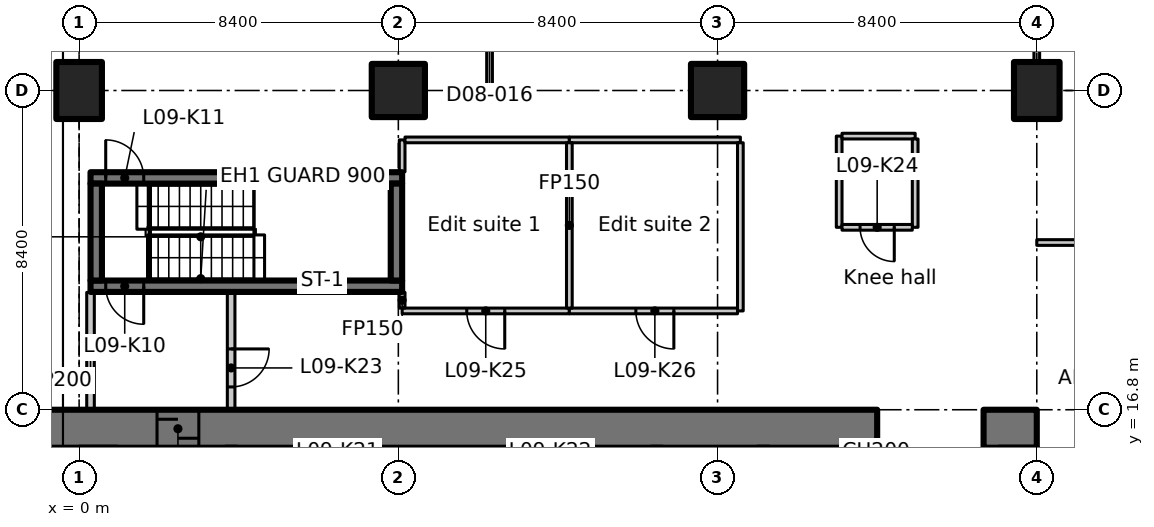
"""IFC4 building model, lengths in metres.
Left out: names, types, materials, properties, quantities, classifications, styles, units other than length and angle.
Written with IfcOpenShell. Run it as: python <this file> out.ifc"""

import sys

from ifc_helpers import new_model, si_unit, direction, frame, frame_2d, origin, origin_2d, place, context, subcontext, project, spatial, polyline, rectangle, outline, extrude, element, fill, save


model = new_model("IFC4")
c1 = context("Model", 3, precision=1e-05, world=origin(), true_north=direction((0.0, 1.0)))
c2 = subcontext(c1, "Body", "Model", "MODEL_VIEW")
j1 = project(units=[si_unit("LENGTHUNIT", "METRE"), si_unit("PLANEANGLEUNIT", "RADIAN")], contexts=[c1])
p1 = place(None, origin())
s1 = spatial("IfcSite", under=j1, at=p1, CompositionType="ELEMENT")
p2 = place(p1, origin())
s2 = spatial("IfcBuilding", under=s1, at=p2, CompositionType="ELEMENT")
p3 = place(p2, frame((0.0, 0.0, 47.3)))
s3 = spatial("IfcBuildingStorey", under=s2, at=p3, CompositionType="ELEMENT", Elevation=47.3)
p4 = place(p3, frame((0.0, 25.2, 0.0), z_axis=(0.0, 0.0, 1.0), x_axis=(1.0, 0.0, 0.0)))
e1 = element("IfcColumn", 1, at=p4, inside=s3, PredefinedType="COLUMN", context=c2, shape_type="SweptSolid", body=[
    extrude(rectangle(XDim=1.2, YDim=1.5, at=origin_2d()), origin(), (0.0, 0.0, 1.0), 3.35),
])
for number, where, z_axis, x_axis in (
    (2, (8.4, 25.2, 0.0), (0.0, 0.0, 1.0), (1.0, 0.0, 0.0)),
    (3, (16.8, 25.2, 0.0), (0.0, 0.0, 1.0), (1.0, 0.0, 0.0)),
):
    element("IfcColumn", number, at=place(p3, frame(where, z_axis=z_axis, x_axis=x_axis)), inside=s3, PredefinedType="COLUMN", context=c2, shape_type="SweptSolid", body=[
        extrude(rectangle(XDim=1.4, YDim=1.4, at=origin_2d()), origin(), (0.0, 0.0, 1.0), 3.35),
    ])
p5 = place(p3, frame((25.2, 25.2, 0.0), z_axis=(0.0, 0.0, 1.0), x_axis=(1.0, 0.0, 0.0)))
e4 = element("IfcColumn", 4, at=p5, inside=s3, PredefinedType="COLUMN", context=c2, shape_type="SweptSolid", body=[
    extrude(rectangle(XDim=1.2, YDim=1.5, at=origin_2d()), origin(), (0.0, 0.0, 1.0), 3.35),
])
p6 = place(p3, frame((-1.1, 16.3, 0.0), z_axis=(0.0, 0.0, 1.0), x_axis=(1.0, 0.0, 0.0)))
e5 = element("IfcWall", 5, at=p6, inside=s3, PredefinedType="SHEAR", context=c2, shape_type="SweptSolid", body=[
    extrude(rectangle(XDim=22.1, YDim=1.0, at=frame_2d((11.05, 0.0))), origin(), (0.0, 0.0, 1.0), 3.35),
])
p7 = place(p6, frame((3.15, 0.0, 0.0)))
e6 = element("IfcOpeningElement", 6, at=p7, cuts=e5, PredefinedType="OPENING", context=c2, shape_type="SweptSolid", body=[
    extrude(rectangle(XDim=1.1, YDim=2.3, at=frame_2d((0.55, 1.15))), frame((0.0, 0.51, 0.0), z_axis=(0.0, -1.0, 0.0), x_axis=(1.0, 0.0, 0.0)), (0.0, 0.0, 1.0), 1.02),
])
p8 = place(p3, frame((23.8, 16.3, 0.0), z_axis=(0.0, 0.0, 1.0), x_axis=(1.0, 0.0, 0.0)))
e7 = element("IfcWall", 7, at=p8, inside=s3, PredefinedType="SHEAR", context=c2, shape_type="SweptSolid", body=[
    extrude(rectangle(XDim=1.4, YDim=1.0, at=frame_2d((0.7, 0.0))), origin(), (0.0, 0.0, 1.0), 3.35),
])
p9 = place(p3, frame((24.7, 12.6, 0.0), z_axis=(0.0, 0.0, 1.0), x_axis=(0.0, 1.0, 0.0)))
e8 = element("IfcWall", 8, at=p9, inside=s3, PredefinedType="SHEAR", context=c2, shape_type="SweptSolid", body=[
    extrude(rectangle(XDim=3.2, YDim=1.0, at=frame_2d((1.6, 0.0))), origin(), (0.0, 0.0, 1.0), 3.35),
])
p10 = place(p3, frame((8.5, 20.05, 0.0), z_axis=(0.0, 0.0, 1.0), x_axis=(-1.0, 0.0, 0.0)))
e9 = element("IfcWall", 9, at=p10, inside=s3, PredefinedType="SHEAR", context=c2, shape_type="SweptSolid", body=[
    extrude(rectangle(XDim=8.2, YDim=0.3, at=frame_2d((4.1, 0.0))), origin(), (0.0, 0.0, 1.0), 3.35),
])
p11 = place(p10, frame((6.8, 0.0, 0.0)))
e10 = element("IfcOpeningElement", 10, at=p11, cuts=e9, PredefinedType="OPENING", context=c2, shape_type="SweptSolid", body=[
    extrude(rectangle(XDim=1.0, YDim=2.1, at=frame_2d((0.5, 1.05))), frame((0.0, 0.16, 0.0), z_axis=(0.0, -1.0, 0.0), x_axis=(1.0, 0.0, 0.0)), (0.0, 0.0, 1.0), 0.32),
])
p12 = place(p3, frame((0.3, 22.9, 0.0), z_axis=(0.0, 0.0, 1.0), x_axis=(1.0, 0.0, 0.0)))
e11 = element("IfcWall", 11, at=p12, inside=s3, PredefinedType="SHEAR", context=c2, shape_type="SweptSolid", body=[
    extrude(rectangle(XDim=8.2, YDim=0.3, at=frame_2d((4.1, 0.0))), origin(), (0.0, 0.0, 1.0), 3.35),
])
p13 = place(p12, frame((0.4, 0.0, 0.0)))
e12 = element("IfcOpeningElement", 12, at=p13, cuts=e11, PredefinedType="OPENING", context=c2, shape_type="SweptSolid", body=[
    extrude(rectangle(XDim=1.0, YDim=2.1, at=frame_2d((0.5, 1.05))), frame((0.0, 0.16, 0.0), z_axis=(0.0, -1.0, 0.0), x_axis=(1.0, 0.0, 0.0)), (0.0, 0.0, 1.0), 0.32),
])
for number, where, z_axis, x_axis in (
    (13, (0.45, 20.2, 0.0), (0.0, 0.0, 1.0), (0.0, 1.0, 0.0)),
    (14, (8.35, 20.2, 0.0), (0.0, 0.0, 1.0), (0.0, 1.0, 0.0)),
):
    element("IfcWall", number, at=place(p3, frame(where, z_axis=z_axis, x_axis=x_axis)), inside=s3, PredefinedType="SHEAR", context=c2, shape_type="SweptSolid", body=[
        extrude(rectangle(XDim=2.55, YDim=0.3, at=frame_2d((1.275, 0.0))), origin(), (0.0, 0.0, 1.0), 3.35),
    ])
p14 = place(p3, frame((0.3, 16.812, 0.0), z_axis=(0.0, 0.0, 1.0), x_axis=(0.0, 1.0, 0.0)))
e15 = element("IfcWall", 15, at=p14, inside=s3, PredefinedType="PARTITIONING", context=c2, shape_type="SweptSolid", body=[
    extrude(rectangle(XDim=3.076, YDim=0.2, at=frame_2d((1.538, 0.0))), origin(), (0.0, 0.0, 1.0), 2.98),
])
p15 = place(p3, frame((4.0, 19.888, 0.0), z_axis=(0.0, 0.0, 1.0), x_axis=(0.0, -1.0, 0.0)))
e16 = element("IfcWall", 16, at=p15, inside=s3, PredefinedType="PARTITIONING", context=c2, shape_type="SweptSolid", body=[
    extrude(rectangle(XDim=3.076, YDim=0.2, at=frame_2d((1.538, 0.0))), origin(), (0.0, 0.0, 1.0), 3.35),
])
p16 = place(p15, frame((1.488, 0.0, 0.0)))
e17 = element("IfcOpeningElement", 17, at=p16, cuts=e16, PredefinedType="OPENING", context=c2, shape_type="SweptSolid", body=[
    extrude(rectangle(XDim=1.0, YDim=2.1, at=frame_2d((0.5, 1.05))), frame((0.0, 0.11, 0.0), z_axis=(0.0, -1.0, 0.0), x_axis=(1.0, 0.0, 0.0)), (0.0, 0.0, 1.0), 0.22),
])
p17 = place(p3, frame((12.9, 19.4, 0.0), z_axis=(0.0, 0.0, 1.0), x_axis=(-1.0, 0.0, 0.0)))
e18 = element("IfcWall", 18, at=p17, inside=s3, PredefinedType="PARTITIONING", context=c2, shape_type="SweptSolid", body=[
    extrude(rectangle(XDim=4.4, YDim=0.15, at=frame_2d((2.2, 0.0))), origin(), (0.0, 0.0, 1.0), 3.35),
])
p18 = place(p17, frame((1.7, 0.0, 0.0)))
e19 = element("IfcOpeningElement", 19, at=p18, cuts=e18, PredefinedType="OPENING", context=c2, shape_type="SweptSolid", body=[
    extrude(rectangle(XDim=1.0, YDim=2.1, at=frame_2d((0.5, 1.05))), frame((0.0, 0.085, 0.0), z_axis=(0.0, -1.0, 0.0), x_axis=(1.0, 0.0, 0.0)), (0.0, 0.0, 1.0), 0.17),
])
p19 = place(p3, frame((8.5, 19.475, 0.0), z_axis=(0.0, 0.0, 1.0), x_axis=(0.0, 1.0, 0.0)))
e20 = element("IfcWall", 20, at=p19, inside=s3, PredefinedType="PARTITIONING", context=c2, shape_type="SweptSolid", body=[
    extrude(rectangle(XDim=0.413, YDim=0.15, at=frame_2d((0.207, 0.0))), origin(), (0.0, 0.0, 1.0), 3.35),
])
p20 = place(p3, frame((8.5, 23.062, 0.0), z_axis=(0.0, 0.0, 1.0), x_axis=(0.0, 1.0, 0.0)))
e21 = element("IfcWall", 21, at=p20, inside=s3, PredefinedType="PARTITIONING", context=c2, shape_type="SweptSolid", body=[
    extrude(rectangle(XDim=0.838, YDim=0.15, at=frame_2d((0.419, 0.0))), origin(), (0.0, 0.0, 1.0), 3.35),
])
p21 = place(p3, frame((8.575, 23.9, 0.0), z_axis=(0.0, 0.0, 1.0), x_axis=(1.0, 0.0, 0.0)))
e22 = element("IfcWall", 22, at=p21, inside=s3, PredefinedType="PARTITIONING", context=c2, shape_type="SweptSolid", body=[
    extrude(rectangle(XDim=4.325, YDim=0.15, at=frame_2d((2.163, 0.0))), origin(), (0.0, 0.0, 1.0), 3.35),
])
p22 = place(p3, frame((12.9, 23.9, 0.0), z_axis=(0.0, 0.0, 1.0), x_axis=(1.0, 0.0, 0.0)))
e23 = element("IfcWall", 23, at=p22, inside=s3, PredefinedType="PARTITIONING", context=c2, shape_type="SweptSolid", body=[
    extrude(rectangle(XDim=4.5, YDim=0.15, at=frame_2d((2.25, 0.0))), origin(), (0.0, 0.0, 1.0), 3.35),
])
p23 = place(p3, frame((17.4, 23.825, 0.0), z_axis=(0.0, 0.0, 1.0), x_axis=(0.0, -1.0, 0.0)))
e24 = element("IfcWall", 24, at=p23, inside=s3, PredefinedType="PARTITIONING", context=c2, shape_type="SweptSolid", body=[
    extrude(rectangle(XDim=4.425, YDim=0.15, at=frame_2d((2.212, 0.0))), origin(), (0.0, 0.0, 1.0), 3.35),
])
p24 = place(p3, frame((17.325, 19.4, 0.0), z_axis=(0.0, 0.0, 1.0), x_axis=(-1.0, 0.0, 0.0)))
e25 = element("IfcWall", 25, at=p24, inside=s3, PredefinedType="PARTITIONING", context=c2, shape_type="SweptSolid", body=[
    extrude(rectangle(XDim=4.425, YDim=0.15, at=frame_2d((2.212, 0.0))), origin(), (0.0, 0.0, 1.0), 3.35),
])
p25 = place(p24, frame((1.675, 0.0, 0.0)))
e26 = element("IfcOpeningElement", 26, at=p25, cuts=e25, PredefinedType="OPENING", context=c2, shape_type="SweptSolid", body=[
    extrude(rectangle(XDim=1.0, YDim=2.1, at=frame_2d((0.5, 1.05))), frame((0.0, 0.085, 0.0), z_axis=(0.0, -1.0, 0.0), x_axis=(1.0, 0.0, 0.0)), (0.0, 0.0, 1.0), 0.17),
])
p26 = place(p3, frame((12.9, 23.825, 0.0), z_axis=(0.0, 0.0, 1.0), x_axis=(0.0, -1.0, 0.0)))
e27 = element("IfcWall", 27, at=p26, inside=s3, PredefinedType="PARTITIONING", context=c2, shape_type="SweptSolid", body=[
    extrude(rectangle(XDim=4.35, YDim=0.15, at=frame_2d((2.175, 0.0))), origin(), (0.0, 0.0, 1.0), 3.35),
])
p27 = place(p3, frame((20.0, 21.6, 0.0), z_axis=(0.0, 0.0, 1.0), x_axis=(0.0, 1.0, 0.0)))
e28 = element("IfcWall", 28, at=p27, inside=s3, PredefinedType="PARTITIONING", context=c2, shape_type="SweptSolid", body=[
    extrude(rectangle(XDim=2.4, YDim=0.15, at=frame_2d((1.2, 0.0))), origin(), (0.0, 0.0, 1.0), 3.35),
])
p28 = place(p3, frame((20.075, 24.0, 0.0), z_axis=(0.0, 0.0, 1.0), x_axis=(1.0, 0.0, 0.0)))
e29 = element("IfcWall", 29, at=p28, inside=s3, PredefinedType="PARTITIONING", context=c2, shape_type="SweptSolid", body=[
    extrude(rectangle(XDim=1.925, YDim=0.15, at=frame_2d((0.962, 0.0))), origin(), (0.0, 0.0, 1.0), 3.35),
])
p29 = place(p3, frame((22.0, 23.925, 0.0), z_axis=(0.0, 0.0, 1.0), x_axis=(0.0, -1.0, 0.0)))
e30 = element("IfcWall", 30, at=p29, inside=s3, PredefinedType="PARTITIONING", context=c2, shape_type="SweptSolid", body=[
    extrude(rectangle(XDim=2.325, YDim=0.15, at=frame_2d((1.163, 0.0))), origin(), (0.0, 0.0, 1.0), 3.35),
])
p30 = place(p3, frame((21.925, 21.6, 0.0), z_axis=(0.0, 0.0, 1.0), x_axis=(-1.0, 0.0, 0.0)))
e31 = element("IfcWall", 31, at=p30, inside=s3, PredefinedType="PARTITIONING", context=c2, shape_type="SweptSolid", body=[
    extrude(rectangle(XDim=1.85, YDim=0.15, at=frame_2d((0.925, 0.0))), origin(), (0.0, 0.0, 1.0), 3.35),
])
p31 = place(p30, frame((0.475, 0.0, 0.0)))
e32 = element("IfcOpeningElement", 32, at=p31, cuts=e31, PredefinedType="OPENING", context=c2, shape_type="SweptSolid", body=[
    extrude(rectangle(XDim=0.9, YDim=2.1, at=frame_2d((0.45, 1.05))), frame((0.0, 0.085, 0.0), z_axis=(0.0, -1.0, 0.0), x_axis=(1.0, 0.0, 0.0)), (0.0, 0.0, 1.0), 0.17),
])
p32 = place(p3, frame((25.2, 21.2, 0.0), z_axis=(0.0, 0.0, 1.0), x_axis=(1.0, 0.0, 0.0)))
e33 = element("IfcWall", 33, at=p32, inside=s3, PredefinedType="PARTITIONING", context=c2, shape_type="SweptSolid", body=[
    extrude(rectangle(XDim=4.2, YDim=0.15, at=frame_2d((2.1, 0.0))), origin(), (0.0, 0.0, 1.0), 3.33),
])
p33 = place(p3, frame((25.2, 31.0, 0.0), z_axis=(0.0, 0.0, 1.0), x_axis=(0.0, -1.0, 0.0)))
e34 = element("IfcWall", 34, at=p33, inside=s3, PredefinedType="PARTITIONING", context=c2, shape_type="SweptSolid", body=[
    extrude(outline(polyline([(0.0, 0.0), (5.03, 0.0), (5.03, 2.98), (0.0, 2.98), (0.0, 0.0)])), frame((0.0, 0.075, 0.0), z_axis=(0.0, -1.0, 0.0), x_axis=(1.0, 0.0, 0.0)), (0.0, 0.0, 1.0), 0.15),
])
p34 = place(p33, frame((1.83, 0.0, 0.0)))
e35 = element("IfcOpeningElement", 35, at=p34, cuts=e34, PredefinedType="OPENING", context=c2, shape_type="SweptSolid", body=[
    extrude(rectangle(XDim=1.1, YDim=2.1, at=frame_2d((0.55, 1.05))), frame((0.0, 0.085, 0.0), z_axis=(0.0, -1.0, 0.0), x_axis=(1.0, 0.0, 0.0)), (0.0, 0.0, 1.0), 0.17),
])
p35 = place(p3, frame((10.8, 25.2, 0.0), z_axis=(0.0, 0.0, 1.0), x_axis=(0.0, 1.0, 0.0)))
e36 = element("IfcWall", 36, at=p35, inside=s3, PredefinedType="PARTITIONING", context=c2, shape_type="SweptSolid", body=[
    extrude(rectangle(XDim=4.2, YDim=0.15, at=frame_2d((2.1, 0.0))), origin(), (0.0, 0.0, 1.0), 3.33),
])
p36 = place(p35, frame((1.5, 0.0, 0.0)))
e37 = element("IfcOpeningElement", 37, at=p36, cuts=e36, PredefinedType="OPENING", context=c2, shape_type="SweptSolid", body=[
    extrude(rectangle(XDim=1.1, YDim=2.1, at=frame_2d((0.55, 1.05))), frame((0.0, 0.085, 0.0), z_axis=(0.0, -1.0, 0.0), x_axis=(1.0, 0.0, 0.0)), (0.0, 0.0, 1.0), 0.17),
])
p37 = place(p7, origin())
e38 = element("IfcDoor", 38, at=p37, inside=s3, OperationType="SLIDING_TO_LEFT", PredefinedType="DOOR", context=c2, shape_type="SweptSolid", body=[
    extrude(rectangle(XDim=1.1, YDim=2.3, at=frame_2d((0.55, 1.15))), frame((0.0, 0.025, 0.0), z_axis=(0.0, -1.0, 0.0), x_axis=(1.0, 0.0, 0.0)), (0.0, 0.0, 1.0), 0.05),
])
fill(e6, e38)
p38 = place(p11, origin())
e39 = element("IfcDoor", 39, at=p38, inside=s3, OperationType="SINGLE_SWING_LEFT", PredefinedType="DOOR", context=c2, shape_type="SweptSolid", body=[
    extrude(rectangle(XDim=1.0, YDim=2.1, at=frame_2d((0.5, 1.05))), frame((0.0, 0.025, 0.0), z_axis=(0.0, -1.0, 0.0), x_axis=(1.0, 0.0, 0.0)), (0.0, 0.0, 1.0), 0.05),
])
fill(e10, e39)
p39 = place(p13, origin())
e40 = element("IfcDoor", 40, at=p39, inside=s3, OperationType="SINGLE_SWING_RIGHT", PredefinedType="DOOR", context=c2, shape_type="SweptSolid", body=[
    extrude(rectangle(XDim=1.0, YDim=2.1, at=frame_2d((0.5, 1.05))), frame((0.0, 0.025, 0.0), z_axis=(0.0, -1.0, 0.0), x_axis=(1.0, 0.0, 0.0)), (0.0, 0.0, 1.0), 0.05),
])
fill(e12, e40)
p40 = place(p16, origin())
e41 = element("IfcDoor", 41, at=p40, inside=s3, OperationType="SINGLE_SWING_RIGHT", PredefinedType="DOOR", context=c2, shape_type="SweptSolid", body=[
    extrude(rectangle(XDim=1.0, YDim=2.1, at=frame_2d((0.5, 1.05))), frame((0.0, 0.025, 0.0), z_axis=(0.0, -1.0, 0.0), x_axis=(1.0, 0.0, 0.0)), (0.0, 0.0, 1.0), 0.05),
])
fill(e17, e41)
p41 = place(p31, origin())
e42 = element("IfcDoor", 42, at=p41, inside=s3, OperationType="SINGLE_SWING_LEFT", PredefinedType="DOOR", context=c2, shape_type="SweptSolid", body=[
    extrude(rectangle(XDim=0.9, YDim=2.1, at=frame_2d((0.45, 1.05))), frame((0.0, 0.025, 0.0), z_axis=(0.0, -1.0, 0.0), x_axis=(1.0, 0.0, 0.0)), (0.0, 0.0, 1.0), 0.05),
])
fill(e32, e42)
p42 = place(p18, origin())
e43 = element("IfcDoor", 43, at=p42, inside=s3, OperationType="SINGLE_SWING_RIGHT", PredefinedType="DOOR", context=c2, shape_type="SweptSolid", body=[
    extrude(rectangle(XDim=1.0, YDim=2.1, at=frame_2d((0.5, 1.05))), frame((0.0, 0.025, 0.0), z_axis=(0.0, -1.0, 0.0), x_axis=(1.0, 0.0, 0.0)), (0.0, 0.0, 1.0), 0.05),
])
fill(e19, e43)
p43 = place(p25, origin())
e44 = element("IfcDoor", 44, at=p43, inside=s3, OperationType="SINGLE_SWING_LEFT", PredefinedType="DOOR", context=c2, shape_type="SweptSolid", body=[
    extrude(rectangle(XDim=1.0, YDim=2.1, at=frame_2d((0.5, 1.05))), frame((0.0, 0.025, 0.0), z_axis=(0.0, -1.0, 0.0), x_axis=(1.0, 0.0, 0.0)), (0.0, 0.0, 1.0), 0.05),
])
fill(e26, e44)
save(model, sys.argv[1])
